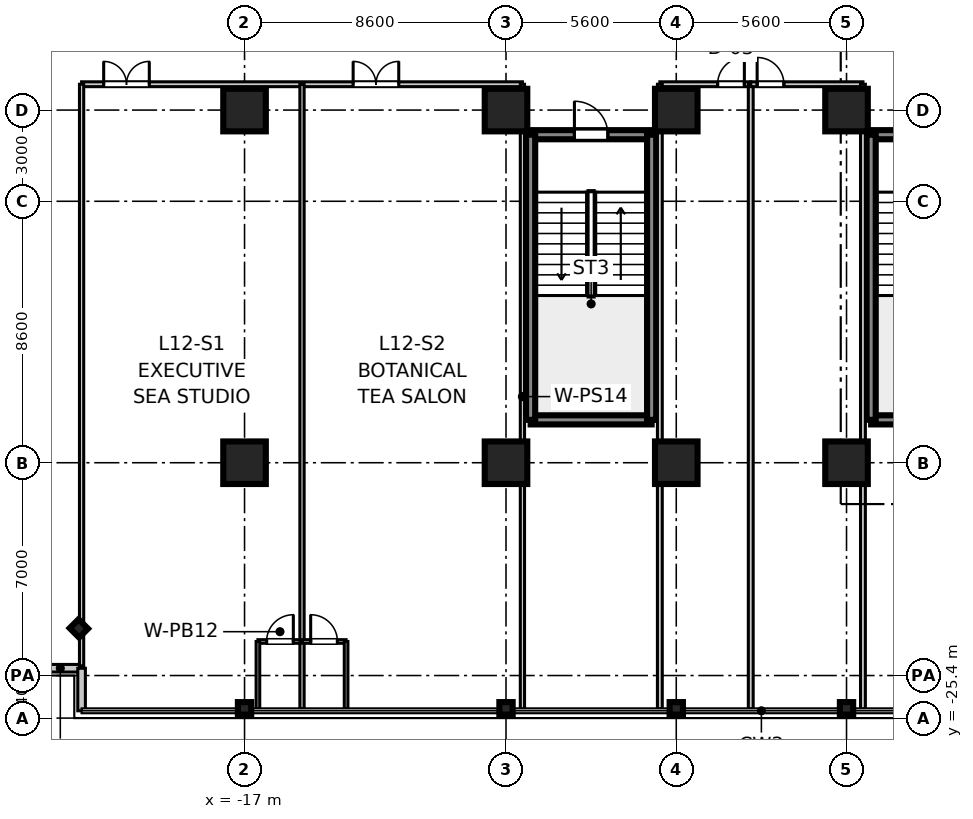
"""IFC4 building model, lengths in metres.
Left out: names, types, materials, properties, quantities, classifications, styles, units other than length and angle.
Written with IfcOpenShell. Run it as: python <this file> out.ifc"""

import sys

from ifc_helpers import new_model, si_unit, direction, frame, frame_2d, origin, origin_2d, place, context, subcontext, project, spatial, rectangle, i_section, extrude, source, transform, mapped, element, fill, save


model = new_model("IFC4")
c1 = context("Model", 3, precision=1e-05, world=origin(), true_north=direction((0.0, 1.0)))
c2 = subcontext(c1, "Body", "Model", "MODEL_VIEW")
j1 = project(units=[si_unit("LENGTHUNIT", "METRE"), si_unit("PLANEANGLEUNIT", "RADIAN")], contexts=[c1])
p1 = place(None, origin())
s1 = spatial("IfcSite", under=j1, at=p1, CompositionType="ELEMENT")
p2 = place(p1, origin())
s2 = spatial("IfcBuilding", under=s1, at=p2, CompositionType="ELEMENT")
p3 = place(p2, frame((0.0, 0.0, 54.3)))
s3 = spatial("IfcBuildingStorey", under=s2, at=p3, CompositionType="ELEMENT", Elevation=54.3)
m1 = source(origin(), c2, "Body", "SweptSolid", [
    extrude(rectangle(XDim=1.4, YDim=1.4, at=origin_2d()), origin(), (0.0, 0.0, 1.0), 3.605),
])
for number, where, z_axis, x_axis in (
    (1, (-17.0, -17.0, 0.0), (0.0, 0.0, 1.0), (1.0, 0.0, 0.0)),
    (2, (-17.0, -5.4, 0.0), (0.0, 0.0, 1.0), (1.0, 0.0, 0.0)),
    (3, (-8.4, -17.0, 0.0), (0.0, 0.0, 1.0), (1.0, 0.0, 0.0)),
    (4, (-8.4, -5.4, 0.0), (0.0, 0.0, 1.0), (1.0, 0.0, 0.0)),
    (5, (-2.8, -17.0, 0.0), (0.0, 0.0, 1.0), (1.0, 0.0, 0.0)),
    (6, (-2.8, -5.4, 0.0), (0.0, 0.0, 1.0), (1.0, 0.0, 0.0)),
    (7, (2.8, -17.0, 0.0), (0.0, 0.0, 1.0), (1.0, 0.0, 0.0)),
    (8, (2.8, -5.4, 0.0), (0.0, 0.0, 1.0), (1.0, 0.0, 0.0)),
):
    element("IfcColumn", number, at=place(p3, frame(where, z_axis=z_axis, x_axis=x_axis)), inside=s3, PredefinedType="COLUMN", context=c2, shape_type="MappedRepresentation", body=[
        mapped(m1, transform((0.0, 0.0, 0.0), scale=1.0)),
    ])
m2 = source(origin(), c2, "Body", "SweptSolid", [
    extrude(i_section(OverallWidth=0.412, OverallDepth=0.438, WebThickness=0.023, FlangeThickness=0.036, at=origin_2d()), origin(), (0.0, 0.0, 1.0), 3.605),
])
for number, where, z_axis, x_axis in (
    (9, (-17.0, -25.08, 0.0), (0.0, 0.0, 1.0), (0.0, 1.0, 0.0)),
    (10, (-8.4, -25.08, 0.0), (0.0, 0.0, 1.0), (0.0, 1.0, 0.0)),
    (11, (-2.8, -25.08, 0.0), (0.0, 0.0, 1.0), (0.0, 1.0, 0.0)),
    (12, (2.8, -25.08, 0.0), (0.0, 0.0, 1.0), (0.0, 1.0, 0.0)),
    (13, (-22.45, -22.45, 0.0), (0.0, 0.0, 1.0), (0.707, 0.707, 0.0)),
):
    element("IfcColumn", number, at=place(p3, frame(where, z_axis=z_axis, x_axis=x_axis)), inside=s3, PredefinedType="COLUMN", context=c2, shape_type="MappedRepresentation", body=[
        mapped(m2, transform((0.0, 0.0, 0.0), scale=1.0)),
    ])
m3 = source(origin(), c2, "Body", "SweptSolid", [
    extrude(rectangle(XDim=3.98, YDim=0.3, at=frame_2d((1.99, 0.0))), origin(), (0.0, 0.0, 1.0), 3.37),
])
for number, where, z_axis, x_axis in (
    (14, (3.61, -15.59, 0.0), (0.0, 0.0, 1.0), (1.0, 0.0, 0.0)),
    (15, (3.61, -6.21, 0.0), (0.0, 0.0, 1.0), (1.0, 0.0, 0.0)),
):
    element("IfcWall", number, at=place(p3, frame(where, z_axis=z_axis, x_axis=x_axis)), inside=s3, PredefinedType="SHEAR", context=c2, shape_type="MappedRepresentation", body=[
        mapped(m3, transform((0.0, 0.0, 0.0), scale=1.0)),
    ])
m4 = source(origin(), c2, "Body", "SweptSolid", [
    extrude(rectangle(XDim=9.38, YDim=0.3, at=frame_2d((4.69, 0.0))), origin(), (0.0, 0.0, 1.0), 3.37),
])
p4 = place(p3, frame((3.61, -15.59, 0.0), z_axis=(0.0, 0.0, 1.0), x_axis=(0.0, 1.0, 0.0)))
e16 = element("IfcWall", 16, at=p4, inside=s3, PredefinedType="SHEAR", context=c2, shape_type="MappedRepresentation", body=[
    mapped(m4, transform((0.0, 0.0, 0.0), scale=1.0)),
])
p5 = place(p3, frame((-7.59, -15.59, 0.0), z_axis=(0.0, 0.0, 1.0), x_axis=(1.0, 0.0, 0.0)))
e17 = element("IfcWall", 17, at=p5, inside=s3, PredefinedType="SHEAR", context=c2, shape_type="MappedRepresentation", body=[
    mapped(m3, transform((0.0, 0.0, 0.0), scale=1.0)),
])
p6 = place(p3, frame((-7.59, -6.21, 0.0), z_axis=(0.0, 0.0, 1.0), x_axis=(1.0, 0.0, 0.0)))
e18 = element("IfcWall", 18, at=p6, inside=s3, PredefinedType="SHEAR", context=c2, shape_type="MappedRepresentation", body=[
    mapped(m3, transform((0.0, 0.0, 0.0), scale=1.0)),
])
p7 = place(p6, frame((1.44, 0.0, 0.0)))
e19 = element("IfcOpeningElement", 19, at=p7, cuts=e18, PredefinedType="OPENING", context=c2, shape_type="SweptSolid", body=[
    extrude(rectangle(XDim=1.1, YDim=2.15, at=frame_2d((0.55, 1.075))), frame((0.0, 0.16, 0.0), z_axis=(0.0, -1.0, 0.0), x_axis=(1.0, 0.0, 0.0)), (0.0, 0.0, 1.0), 0.32),
])
for number, where, z_axis, x_axis in (
    (20, (-7.59, -15.59, 0.0), (0.0, 0.0, 1.0), (0.0, 1.0, 0.0)),
    (21, (-3.61, -15.59, 0.0), (0.0, 0.0, 1.0), (0.0, 1.0, 0.0)),
):
    element("IfcWall", number, at=place(p3, frame(where, z_axis=z_axis, x_axis=x_axis)), inside=s3, PredefinedType="SHEAR", context=c2, shape_type="MappedRepresentation", body=[
        mapped(m4, transform((0.0, 0.0, 0.0), scale=1.0)),
    ])
m5 = source(origin(), c2, "Body", "SweptSolid", [
    extrude(rectangle(XDim=1.4, YDim=0.25, at=frame_2d((0.7, 0.0))), origin(), (0.0, 0.0, 1.0), 3.37),
])
for number, where, z_axis, x_axis in (
    (22, (-23.76, -23.76, 0.0), (0.0, 0.0, 1.0), (1.0, 0.0, 0.0)),
    (23, (-22.36, -25.16, 0.0), (0.0, 0.0, 1.0), (0.0, 1.0, 0.0)),
):
    element("IfcWall", number, at=place(p3, frame(where, z_axis=z_axis, x_axis=x_axis)), inside=s3, PredefinedType="STANDARD", context=c2, shape_type="MappedRepresentation", body=[
        mapped(m5, transform((0.0, 0.0, 0.0), scale=1.0)),
    ])
m6 = source(origin(), c2, "Body", "SweptSolid", [
    extrude(rectangle(XDim=14.5, YDim=0.16, at=frame_2d((7.25, 0.0))), origin(), (0.0, 0.0, 1.0), 2.71),
])
p8 = place(p3, frame((-22.36, -4.55, 0.0), z_axis=(0.0, 0.0, 1.0), x_axis=(1.0, 0.0, 0.0)))
e24 = element("IfcWall", 24, at=p8, inside=s3, PredefinedType="PARTITIONING", context=c2, shape_type="MappedRepresentation", body=[
    mapped(m6, transform((0.0, 0.0, 0.0), scale=1.0)),
])
p9 = place(p8, frame((0.727, 0.0, 0.0)))
e25 = element("IfcOpeningElement", 25, at=p9, cuts=e24, PredefinedType="OPENING", context=c2, shape_type="SweptSolid", body=[
    extrude(rectangle(XDim=1.5, YDim=2.15, at=frame_2d((0.75, 1.075))), frame((0.0, 0.09, 0.0), z_axis=(0.0, -1.0, 0.0), x_axis=(1.0, 0.0, 0.0)), (0.0, 0.0, 1.0), 0.18),
])
p10 = place(p8, frame((8.932, 0.0, 0.0)))
e26 = element("IfcOpeningElement", 26, at=p10, cuts=e24, PredefinedType="OPENING", context=c2, shape_type="SweptSolid", body=[
    extrude(rectangle(XDim=1.5, YDim=2.15, at=frame_2d((0.75, 1.075))), frame((0.0, 0.09, 0.0), z_axis=(0.0, -1.0, 0.0), x_axis=(1.0, 0.0, 0.0)), (0.0, 0.0, 1.0), 0.18),
])
m7 = source(origin(), c2, "Body", "SweptSolid", [
    extrude(rectangle(XDim=19.13, YDim=0.14, at=frame_2d((9.565, 0.0))), origin(), (0.0, 0.0, 1.0), 2.71),
])
p11 = place(p3, frame((-22.36, -23.68, 0.0), z_axis=(0.0, 0.0, 1.0), x_axis=(0.0, 1.0, 0.0)))
e27 = element("IfcWall", 27, at=p11, inside=s3, PredefinedType="PARTITIONING", context=c2, shape_type="MappedRepresentation", body=[
    mapped(m7, transform((0.0, 0.0, 0.0), scale=1.0)),
])
m8 = source(origin(), c2, "Body", "SweptSolid", [
    extrude(rectangle(XDim=20.55, YDim=0.14, at=frame_2d((10.275, 0.0))), origin(), (0.0, 0.0, 1.0), 2.71),
])
p12 = place(p3, frame((-7.86, -25.1, 0.0), z_axis=(0.0, 0.0, 1.0), x_axis=(0.0, 1.0, 0.0)))
e28 = element("IfcWall", 28, at=p12, inside=s3, PredefinedType="PARTITIONING", context=c2, shape_type="MappedRepresentation", body=[
    mapped(m8, transform((0.0, 0.0, 0.0), scale=1.0)),
])
m9 = source(origin(), c2, "Body", "SweptSolid", [
    extrude(rectangle(XDim=1.45, YDim=0.12, at=frame_2d((0.725, 0.0))), origin(), (0.0, 0.0, 1.0), 2.71),
])
p13 = place(p3, frame((-16.56, -22.88, 0.0), z_axis=(0.0, 0.0, 1.0), x_axis=(1.0, 0.0, 0.0)))
e29 = element("IfcWall", 29, at=p13, inside=s3, PredefinedType="PARTITIONING", context=c2, shape_type="MappedRepresentation", body=[
    mapped(m9, transform((0.0, 0.0, 0.0), scale=1.0)),
])
p14 = place(p13, frame((0.285, 0.0, 0.0)))
e30 = element("IfcOpeningElement", 30, at=p14, cuts=e29, PredefinedType="OPENING", context=c2, shape_type="SweptSolid", body=[
    extrude(rectangle(XDim=0.88, YDim=2.1, at=frame_2d((0.44, 1.05))), frame((0.0, 0.07, 0.0), z_axis=(0.0, -1.0, 0.0), x_axis=(1.0, 0.0, 0.0)), (0.0, 0.0, 1.0), 0.14),
])
m10 = source(origin(), c2, "Body", "SweptSolid", [
    extrude(rectangle(XDim=2.22, YDim=0.12, at=frame_2d((1.11, 0.0))), origin(), (0.0, 0.0, 1.0), 2.71),
])
p15 = place(p3, frame((-16.56, -25.1, 0.0), z_axis=(0.0, 0.0, 1.0), x_axis=(0.0, 1.0, 0.0)))
e31 = element("IfcWall", 31, at=p15, inside=s3, PredefinedType="PARTITIONING", context=c2, shape_type="MappedRepresentation", body=[
    mapped(m10, transform((0.0, 0.0, 0.0), scale=1.0)),
])
p16 = place(p3, frame((-15.11, -25.1, 0.0), z_axis=(0.0, 0.0, 1.0), x_axis=(0.0, 1.0, 0.0)))
e32 = element("IfcWall", 32, at=p16, inside=s3, PredefinedType="PARTITIONING", context=c2, shape_type="MappedRepresentation", body=[
    mapped(m8, transform((0.0, 0.0, 0.0), scale=1.0)),
])
m11 = source(origin(), c2, "Body", "SweptSolid", [
    extrude(rectangle(XDim=1.45, YDim=0.12, at=frame_2d((0.725, 0.0))), origin(), (0.0, 0.0, 1.0), 2.71),
])
p17 = place(p3, frame((-15.11, -22.88, 0.0), z_axis=(0.0, 0.0, 1.0), x_axis=(1.0, 0.0, 0.0)))
e33 = element("IfcWall", 33, at=p17, inside=s3, PredefinedType="PARTITIONING", context=c2, shape_type="MappedRepresentation", body=[
    mapped(m11, transform((0.0, 0.0, 0.0), scale=1.0)),
])
p18 = place(p17, frame((0.285, 0.0, 0.0)))
e34 = element("IfcOpeningElement", 34, at=p18, cuts=e33, PredefinedType="OPENING", context=c2, shape_type="SweptSolid", body=[
    extrude(rectangle(XDim=0.88, YDim=2.1, at=frame_2d((0.44, 1.05))), frame((0.0, 0.07, 0.0), z_axis=(0.0, -1.0, 0.0), x_axis=(1.0, 0.0, 0.0)), (0.0, 0.0, 1.0), 0.14),
])
p19 = place(p3, frame((-13.66, -25.1, 0.0), z_axis=(0.0, 0.0, 1.0), x_axis=(0.0, 1.0, 0.0)))
e35 = element("IfcWall", 35, at=p19, inside=s3, PredefinedType="PARTITIONING", context=c2, shape_type="MappedRepresentation", body=[
    mapped(m10, transform((0.0, 0.0, 0.0), scale=1.0)),
])
m12 = source(origin(), c2, "Body", "SweptSolid", [
    extrude(rectangle(XDim=2.99, YDim=0.16, at=frame_2d((1.495, 0.0))), origin(), (0.0, 0.0, 1.0), 2.71),
])
p20 = place(p3, frame((-3.34, -4.55, 0.0), z_axis=(0.0, 0.0, 1.0), x_axis=(1.0, 0.0, 0.0)))
e36 = element("IfcWall", 36, at=p20, inside=s3, PredefinedType="PARTITIONING", context=c2, shape_type="MappedRepresentation", body=[
    mapped(m12, transform((0.0, 0.0, 0.0), scale=1.0)),
])
p21 = place(p20, frame((1.9, 0.0, 0.0)))
e37 = element("IfcOpeningElement", 37, at=p21, cuts=e36, PredefinedType="OPENING", context=c2, shape_type="SweptSolid", body=[
    extrude(rectangle(XDim=0.88, YDim=2.1, at=frame_2d((0.44, 1.05))), frame((0.0, 0.09, 0.0), z_axis=(0.0, -1.0, 0.0), x_axis=(1.0, 0.0, 0.0)), (0.0, 0.0, 1.0), 0.18),
])
m13 = source(origin(), c2, "Body", "SweptSolid", [
    extrude(rectangle(XDim=20.55, YDim=0.16, at=frame_2d((10.275, 0.0))), origin(), (0.0, 0.0, 1.0), 2.71),
])
for number, where, z_axis, x_axis in (
    (38, (-3.34, -25.1, 0.0), (0.0, 0.0, 1.0), (0.0, 1.0, 0.0)),
    (39, (-0.35, -25.1, 0.0), (0.0, 0.0, 1.0), (0.0, 1.0, 0.0)),
):
    element("IfcWall", number, at=place(p3, frame(where, z_axis=z_axis, x_axis=x_axis)), inside=s3, PredefinedType="PARTITIONING", context=c2, shape_type="MappedRepresentation", body=[
        mapped(m13, transform((0.0, 0.0, 0.0), scale=1.0)),
    ])
m14 = source(origin(), c2, "Body", "SweptSolid", [
    extrude(rectangle(XDim=3.69, YDim=0.16, at=frame_2d((1.845, 0.0))), origin(), (0.0, 0.0, 1.0), 2.71),
])
p22 = place(p3, frame((-0.35, -4.55, 0.0), z_axis=(0.0, 0.0, 1.0), x_axis=(1.0, 0.0, 0.0)))
e40 = element("IfcWall", 40, at=p22, inside=s3, PredefinedType="PARTITIONING", context=c2, shape_type="MappedRepresentation", body=[
    mapped(m14, transform((0.0, 0.0, 0.0), scale=1.0)),
])
p23 = place(p22, frame((0.21, 0.0, 0.0)))
e41 = element("IfcOpeningElement", 41, at=p23, cuts=e40, PredefinedType="OPENING", context=c2, shape_type="SweptSolid", body=[
    extrude(rectangle(XDim=0.88, YDim=2.1, at=frame_2d((0.44, 1.05))), frame((0.0, 0.09, 0.0), z_axis=(0.0, -1.0, 0.0), x_axis=(1.0, 0.0, 0.0)), (0.0, 0.0, 1.0), 0.18),
])
p24 = place(p3, frame((3.34, -25.1, 0.0), z_axis=(0.0, 0.0, 1.0), x_axis=(0.0, 1.0, 0.0)))
e42 = element("IfcWall", 42, at=p24, inside=s3, PredefinedType="PARTITIONING", context=c2, shape_type="MappedRepresentation", body=[
    mapped(m13, transform((0.0, 0.0, 0.0), scale=1.0)),
])
m15 = source(origin(), c2, "Body", "SweptSolid", [
    extrude(rectangle(XDim=1.1, YDim=2.15, at=frame_2d((0.55, 1.075))), frame((0.0, 0.025, 0.0), z_axis=(0.0, -1.0, 0.0), x_axis=(1.0, 0.0, 0.0)), (0.0, 0.0, 1.0), 0.05),
])
p25 = place(p7, frame((1.1, 0.0, 0.0), z_axis=(0.0, 0.0, 1.0), x_axis=(-1.0, 0.0, 0.0)))
e43 = element("IfcDoor", 43, at=p25, inside=s3, OperationType="SINGLE_SWING_LEFT", PredefinedType="DOOR", context=c2, shape_type="MappedRepresentation", body=[
    mapped(m15, transform((0.0, 0.0, 0.0), scale=1.0)),
])
fill(e19, e43)
m16 = source(origin(), c2, "Body", "SweptSolid", [
    extrude(rectangle(XDim=0.88, YDim=2.1, at=frame_2d((0.44, 1.05))), frame((0.0, 0.025, 0.0), z_axis=(0.0, -1.0, 0.0), x_axis=(1.0, 0.0, 0.0)), (0.0, 0.0, 1.0), 0.05),
])
p26 = place(p14, frame((0.88, 0.0, 0.0), z_axis=(0.0, 0.0, 1.0), x_axis=(-1.0, 0.0, 0.0)))
e44 = element("IfcDoor", 44, at=p26, inside=s3, OperationType="SINGLE_SWING_RIGHT", PredefinedType="DOOR", context=c2, shape_type="MappedRepresentation", body=[
    mapped(m16, transform((0.0, 0.0, 0.0), scale=1.0)),
])
fill(e30, e44)
m17 = source(origin(), c2, "Body", "SweptSolid", [
    extrude(rectangle(XDim=1.5, YDim=2.15, at=frame_2d((0.75, 1.075))), frame((0.0, 0.025, 0.0), z_axis=(0.0, -1.0, 0.0), x_axis=(1.0, 0.0, 0.0)), (0.0, 0.0, 1.0), 0.05),
])
p27 = place(p9, frame((1.5, 0.0, 0.0), z_axis=(0.0, 0.0, 1.0), x_axis=(-1.0, 0.0, 0.0)))
e45 = element("IfcDoor", 45, at=p27, inside=s3, OperationType="DOUBLE_DOOR_SINGLE_SWING", PredefinedType="DOOR", context=c2, shape_type="MappedRepresentation", body=[
    mapped(m17, transform((0.0, 0.0, 0.0), scale=1.0)),
])
fill(e25, e45)
p28 = place(p18, frame((0.88, 0.0, 0.0), z_axis=(0.0, 0.0, 1.0), x_axis=(-1.0, 0.0, 0.0)))
e46 = element("IfcDoor", 46, at=p28, inside=s3, OperationType="SINGLE_SWING_LEFT", PredefinedType="DOOR", context=c2, shape_type="MappedRepresentation", body=[
    mapped(m16, transform((0.0, 0.0, 0.0), scale=1.0)),
])
fill(e34, e46)
p29 = place(p10, frame((1.5, 0.0, 0.0), z_axis=(0.0, 0.0, 1.0), x_axis=(-1.0, 0.0, 0.0)))
e47 = element("IfcDoor", 47, at=p29, inside=s3, OperationType="DOUBLE_DOOR_SINGLE_SWING", PredefinedType="DOOR", context=c2, shape_type="MappedRepresentation", body=[
    mapped(m17, transform((0.0, 0.0, 0.0), scale=1.0)),
])
fill(e26, e47)
p30 = place(p21, frame((0.88, 0.0, 0.0), z_axis=(0.0, 0.0, 1.0), x_axis=(-1.0, 0.0, 0.0)))
e48 = element("IfcDoor", 48, at=p30, inside=s3, OperationType="SINGLE_SWING_RIGHT", PredefinedType="DOOR", context=c2, shape_type="MappedRepresentation", body=[
    mapped(m16, transform((0.0, 0.0, 0.0), scale=1.0)),
])
fill(e37, e48)
p31 = place(p23, frame((0.88, 0.0, 0.0), z_axis=(0.0, 0.0, 1.0), x_axis=(-1.0, 0.0, 0.0)))
e49 = element("IfcDoor", 49, at=p31, inside=s3, OperationType="SINGLE_SWING_LEFT", PredefinedType="DOOR", context=c2, shape_type="MappedRepresentation", body=[
    mapped(m16, transform((0.0, 0.0, 0.0), scale=1.0)),
])
fill(e41, e49)
save(model, sys.argv[1])
